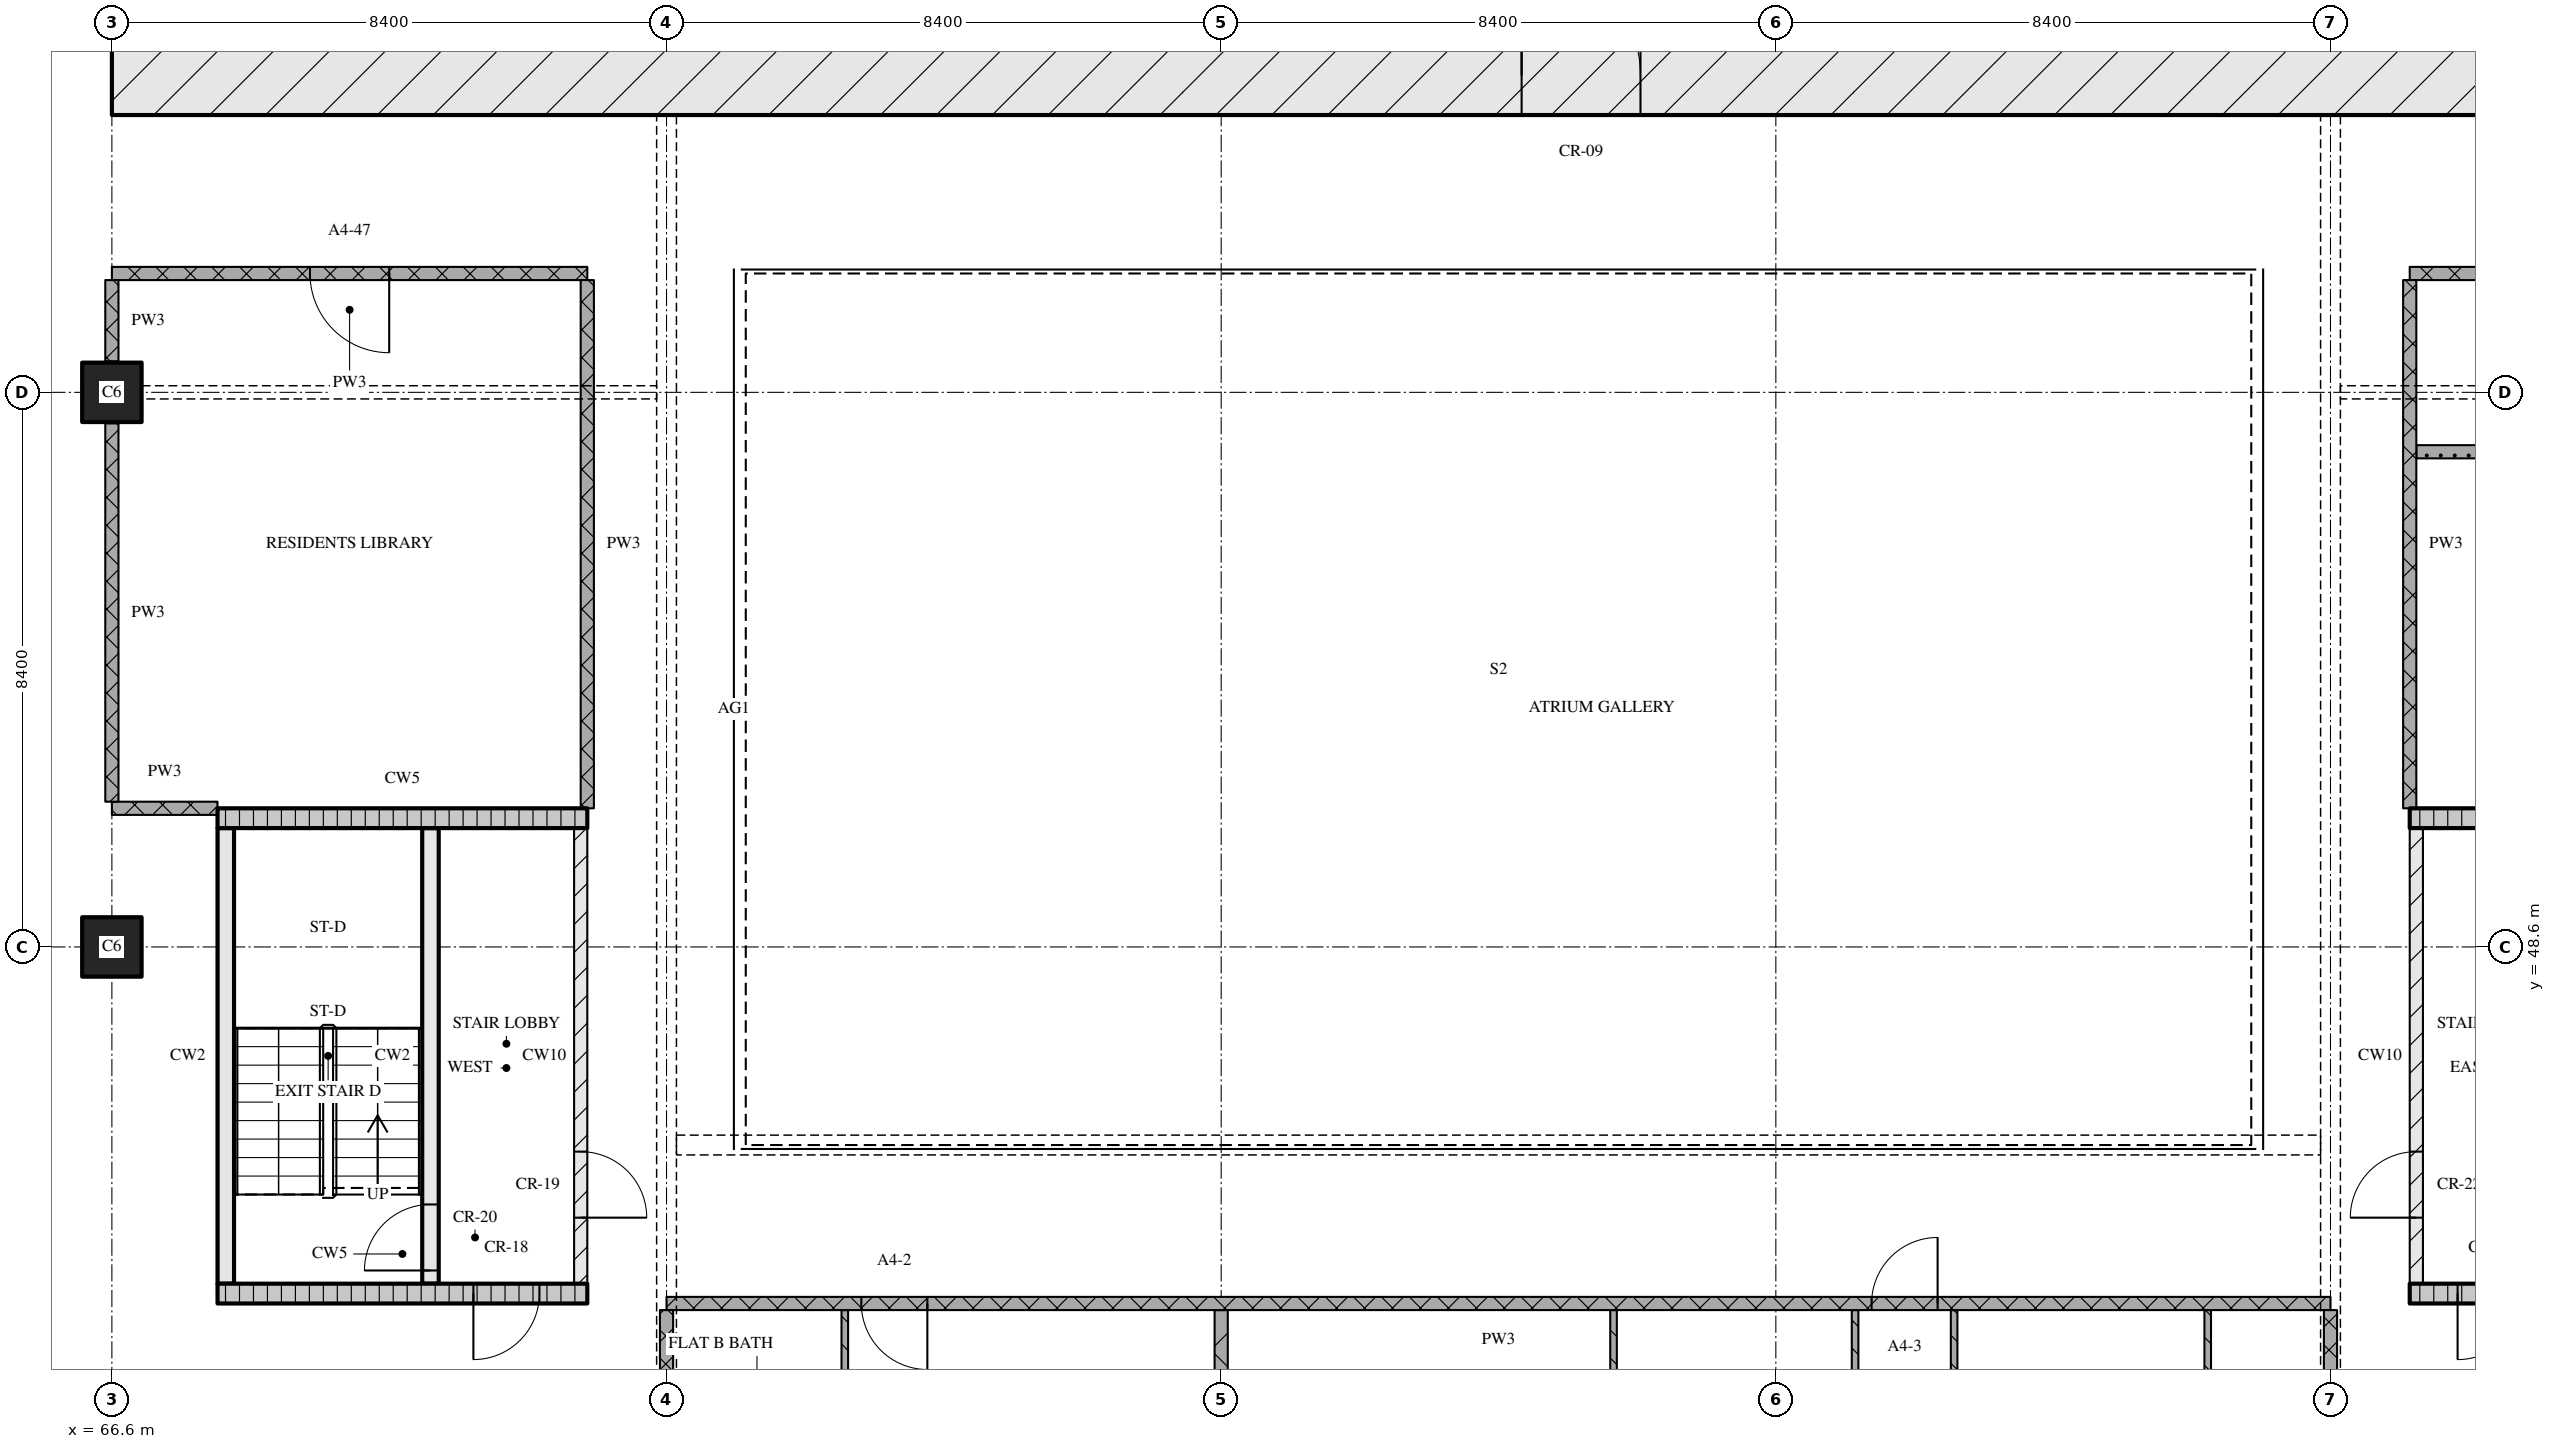
"""IFC4 building model, lengths in metres.
Left out: names, types, materials, properties, quantities, classifications, styles, units other than length and angle.
Written with IfcOpenShell. Run it as: python <this file> out.ifc"""

import sys

from ifc_helpers import new_model, si_unit, direction, frame, frame_2d, origin, origin_2d, place, context, subcontext, project, spatial, rectangle, extrude, element, fill, save


model = new_model("IFC4")
c1 = context("Model", 3, precision=1e-05, world=origin(), true_north=direction((0.0, 1.0)))
c2 = subcontext(c1, "Body", "Model", "MODEL_VIEW")
j1 = project(units=[si_unit("LENGTHUNIT", "METRE"), si_unit("PLANEANGLEUNIT", "RADIAN")], contexts=[c1])
p1 = place(None, origin())
s1 = spatial("IfcSite", under=j1, at=p1, CompositionType="ELEMENT")
p2 = place(p1, origin())
s2 = spatial("IfcBuilding", under=s1, at=p2, CompositionType="ELEMENT")
p3 = place(p2, frame((0.0, 0.0, 73.2)))
s3 = spatial("IfcBuildingStorey", under=s2, at=p3, CompositionType="ELEMENT", Elevation=73.2)
for number, where, z_axis, x_axis in (
    (1, (66.6, 48.6, 0.0), (0.0, 0.0, 1.0), (1.0, 0.0, 0.0)),
    (2, (66.6, 57.0, 0.0), (0.0, 0.0, 1.0), (1.0, 0.0, 0.0)),
):
    element("IfcColumn", number, at=place(p3, frame(where, z_axis=z_axis, x_axis=x_axis)), inside=s3, PredefinedType="COLUMN", context=c2, shape_type="SweptSolid", body=[
        extrude(rectangle(XDim=0.9, YDim=0.9, at=origin_2d()), origin(), (0.0, 0.0, 1.0), 3.6),
    ])
p4 = place(p3, frame((66.6, 61.8, 0.0), z_axis=(0.0, 0.0, 1.0), x_axis=(1.0, 0.0, 0.0)))
e3 = element("IfcWall", 3, at=p4, inside=s3, PredefinedType="SOLIDWALL", context=c2, shape_type="SweptSolid", body=[
    extrude(rectangle(XDim=42.0, YDim=1.2, at=frame_2d((21.0, 0.0))), origin(), (0.0, 0.0, 1.0), 3.32),
])
p5 = place(p4, frame((21.35, 0.0, 0.0)))
e4 = element("IfcOpeningElement", 4, at=p5, cuts=e3, PredefinedType="OPENING", context=c2, shape_type="SweptSolid", body=[
    extrude(rectangle(XDim=1.8, YDim=2.1, at=frame_2d((0.9, 1.05))), frame((0.0, 0.61, 0.0), z_axis=(0.0, -1.0, 0.0), x_axis=(1.0, 0.0, 0.0)), (0.0, 0.0, 1.0), 1.22),
])
p6 = place(p3, frame((68.2, 43.35, 0.0), z_axis=(0.0, 0.0, 1.0), x_axis=(1.0, 0.0, 0.0)))
e5 = element("IfcWall", 5, at=p6, inside=s3, PredefinedType="SOLIDWALL", context=c2, shape_type="SweptSolid", body=[
    extrude(rectangle(XDim=5.6, YDim=0.3, at=frame_2d((2.8, 0.0))), origin(), (0.0, 0.0, 1.0), 3.32),
])
p7 = place(p6, frame((3.875, 0.0, 0.0)))
e6 = element("IfcOpeningElement", 6, at=p7, cuts=e5, PredefinedType="OPENING", context=c2, shape_type="SweptSolid", body=[
    extrude(rectangle(XDim=1.0, YDim=2.1, at=frame_2d((0.5, 1.05))), frame((0.0, 0.16, 0.0), z_axis=(0.0, -1.0, 0.0), x_axis=(1.0, 0.0, 0.0)), (0.0, 0.0, 1.0), 0.32),
])
p8 = place(p3, frame((68.325, 43.5, 0.0), z_axis=(0.0, 0.0, 1.0), x_axis=(0.0, 1.0, 0.0)))
e7 = element("IfcWall", 7, at=p8, inside=s3, PredefinedType="SOLIDWALL", context=c2, shape_type="SweptSolid", body=[
    extrude(rectangle(XDim=6.9, YDim=0.25, at=frame_2d((3.45, 0.0))), origin(), (0.0, 0.0, 1.0), 3.32),
])
p9 = place(p3, frame((71.425, 43.5, 0.0), z_axis=(0.0, 0.0, 1.0), x_axis=(0.0, 1.0, 0.0)))
e8 = element("IfcWall", 8, at=p9, inside=s3, PredefinedType="SOLIDWALL", context=c2, shape_type="SweptSolid", body=[
    extrude(rectangle(XDim=6.9, YDim=0.25, at=frame_2d((3.45, 0.0))), origin(), (0.0, 0.0, 1.0), 3.32),
])
p10 = place(p9, frame((0.2, 0.0, 0.0)))
e9 = element("IfcOpeningElement", 9, at=p10, cuts=e8, PredefinedType="OPENING", context=c2, shape_type="SweptSolid", body=[
    extrude(rectangle(XDim=1.0, YDim=2.1, at=frame_2d((0.5, 1.05))), frame((0.0, 0.135, 0.0), z_axis=(0.0, -1.0, 0.0), x_axis=(1.0, 0.0, 0.0)), (0.0, 0.0, 1.0), 0.27),
])
p11 = place(p3, frame((73.7, 43.5, 0.0), z_axis=(0.0, 0.0, 1.0), x_axis=(0.0, 1.0, 0.0)))
e10 = element("IfcWall", 10, at=p11, inside=s3, PredefinedType="PARTITIONING", context=c2, shape_type="SweptSolid", body=[
    extrude(rectangle(XDim=6.9, YDim=0.2, at=frame_2d((3.45, 0.0))), origin(), (0.0, 0.0, 1.0), 3.32),
])
p12 = place(p11, frame((1.0, 0.0, 0.0)))
e11 = element("IfcOpeningElement", 11, at=p12, cuts=e10, PredefinedType="OPENING", context=c2, shape_type="SweptSolid", body=[
    extrude(rectangle(XDim=1.0, YDim=2.1, at=frame_2d((0.5, 1.05))), frame((0.0, 0.11, 0.0), z_axis=(0.0, -1.0, 0.0), x_axis=(1.0, 0.0, 0.0)), (0.0, 0.0, 1.0), 0.22),
])
p13 = place(p3, frame((68.2, 50.55, 0.0), z_axis=(0.0, 0.0, 1.0), x_axis=(1.0, 0.0, 0.0)))
e12 = element("IfcWall", 12, at=p13, inside=s3, PredefinedType="SOLIDWALL", context=c2, shape_type="SweptSolid", body=[
    extrude(rectangle(XDim=5.6, YDim=0.3, at=frame_2d((2.8, 0.0))), origin(), (0.0, 0.0, 1.0), 3.32),
])
p14 = place(p3, frame((101.4, 43.35, 0.0), z_axis=(0.0, 0.0, 1.0), x_axis=(1.0, 0.0, 0.0)))
e13 = element("IfcWall", 13, at=p14, inside=s3, PredefinedType="SOLIDWALL", context=c2, shape_type="SweptSolid", body=[
    extrude(rectangle(XDim=5.6, YDim=0.3, at=frame_2d((2.8, 0.0))), origin(), (0.0, 0.0, 1.0), 3.32),
])
p15 = place(p14, frame((0.725, 0.0, 0.0)))
e14 = element("IfcOpeningElement", 14, at=p15, cuts=e13, PredefinedType="OPENING", context=c2, shape_type="SweptSolid", body=[
    extrude(rectangle(XDim=1.0, YDim=2.1, at=frame_2d((0.5, 1.05))), frame((0.0, 0.16, 0.0), z_axis=(0.0, -1.0, 0.0), x_axis=(1.0, 0.0, 0.0)), (0.0, 0.0, 1.0), 0.32),
])
p16 = place(p3, frame((101.5, 43.5, 0.0), z_axis=(0.0, 0.0, 1.0), x_axis=(0.0, 1.0, 0.0)))
e15 = element("IfcWall", 15, at=p16, inside=s3, PredefinedType="PARTITIONING", context=c2, shape_type="SweptSolid", body=[
    extrude(rectangle(XDim=6.9, YDim=0.2, at=frame_2d((3.45, 0.0))), origin(), (0.0, 0.0, 1.0), 3.32),
])
p17 = place(p16, frame((1.0, 0.0, 0.0)))
e16 = element("IfcOpeningElement", 16, at=p17, cuts=e15, PredefinedType="OPENING", context=c2, shape_type="SweptSolid", body=[
    extrude(rectangle(XDim=1.0, YDim=2.1, at=frame_2d((0.5, 1.05))), frame((0.0, 0.11, 0.0), z_axis=(0.0, -1.0, 0.0), x_axis=(1.0, 0.0, 0.0)), (0.0, 0.0, 1.0), 0.22),
])
p18 = place(p3, frame((101.4, 50.55, 0.0), z_axis=(0.0, 0.0, 1.0), x_axis=(1.0, 0.0, 0.0)))
e17 = element("IfcWall", 17, at=p18, inside=s3, PredefinedType="SOLIDWALL", context=c2, shape_type="SweptSolid", body=[
    extrude(rectangle(XDim=5.6, YDim=0.3, at=frame_2d((2.8, 0.0))), origin(), (0.0, 0.0, 1.0), 3.32),
])
p19 = place(p3, frame((100.2, 43.2, 0.0), z_axis=(0.0, 0.0, 1.0), x_axis=(-1.0, 0.0, 0.0)))
e18 = element("IfcWall", 18, at=p19, inside=s3, PredefinedType="PARTITIONING", context=c2, shape_type="SweptSolid", body=[
    extrude(rectangle(XDim=25.2, YDim=0.2, at=frame_2d((12.6, 0.0))), origin(), (0.0, 0.0, 1.0), 3.32),
])
p20 = place(p19, frame((5.95, 0.0, 0.0)))
e19 = element("IfcOpeningElement", 19, at=p20, cuts=e18, PredefinedType="OPENING", context=c2, shape_type="SweptSolid", body=[
    extrude(rectangle(XDim=1.0, YDim=2.1, at=frame_2d((0.5, 1.05))), frame((0.0, 0.11, 0.0), z_axis=(0.0, -1.0, 0.0), x_axis=(1.0, 0.0, 0.0)), (0.0, 0.0, 1.0), 0.22),
])
p21 = place(p19, frame((21.25, 0.0, 0.0)))
e20 = element("IfcOpeningElement", 20, at=p21, cuts=e18, PredefinedType="OPENING", context=c2, shape_type="SweptSolid", body=[
    extrude(rectangle(XDim=1.0, YDim=2.1, at=frame_2d((0.5, 1.05))), frame((0.0, 0.11, 0.0), z_axis=(0.0, -1.0, 0.0), x_axis=(1.0, 0.0, 0.0)), (0.0, 0.0, 1.0), 0.22),
])
p22 = place(p3, frame((66.6, 50.7, 0.0), z_axis=(0.0, 0.0, 1.0), x_axis=(1.0, 0.0, 0.0)))
e21 = element("IfcWall", 21, at=p22, inside=s3, PredefinedType="PARTITIONING", context=c2, shape_type="SweptSolid", body=[
    extrude(rectangle(XDim=1.6, YDim=0.2, at=frame_2d((0.8, 0.0))), origin(), (0.0, 0.0, 1.0), 3.32),
])
p23 = place(p3, frame((101.5, 56.1, 0.0), z_axis=(0.0, 0.0, 1.0), x_axis=(1.0, 0.0, 0.0)))
e22 = element("IfcWall", 22, at=p23, inside=s3, PredefinedType="PARTITIONING", context=c2, shape_type="SweptSolid", body=[
    extrude(rectangle(XDim=7.0, YDim=0.2, at=frame_2d((3.5, 0.0))), origin(), (0.0, 0.0, 1.0), 3.32),
])
p24 = place(p3, frame((73.8, 58.8, 0.0), z_axis=(0.0, 0.0, 1.0), x_axis=(-1.0, 0.0, 0.0)))
e23 = element("IfcWall", 23, at=p24, inside=s3, PredefinedType="PARTITIONING", context=c2, shape_type="SweptSolid", body=[
    extrude(rectangle(XDim=7.2, YDim=0.2, at=frame_2d((3.6, 0.0))), origin(), (0.0, 0.0, 1.0), 3.32),
])
p25 = place(p24, frame((3.0, 0.0, 0.0)))
e24 = element("IfcOpeningElement", 24, at=p25, cuts=e23, PredefinedType="OPENING", context=c2, shape_type="SweptSolid", body=[
    extrude(rectangle(XDim=1.2, YDim=2.1, at=frame_2d((0.6, 1.05))), frame((0.0, 0.11, 0.0), z_axis=(0.0, -1.0, 0.0), x_axis=(1.0, 0.0, 0.0)), (0.0, 0.0, 1.0), 0.22),
])
p26 = place(p3, frame((101.4, 58.8, 0.0), z_axis=(0.0, 0.0, 1.0), x_axis=(1.0, 0.0, 0.0)))
e25 = element("IfcWall", 25, at=p26, inside=s3, PredefinedType="PARTITIONING", context=c2, shape_type="SweptSolid", body=[
    extrude(rectangle(XDim=7.2, YDim=0.2, at=frame_2d((3.6, 0.0))), origin(), (0.0, 0.0, 1.0), 3.32),
])
p27 = place(p3, frame((66.6, 56.53, 0.0), z_axis=(0.0, 0.0, 1.0), x_axis=(0.0, -1.0, 0.0)))
e26 = element("IfcWall", 26, at=p27, inside=s3, PredefinedType="PARTITIONING", context=c2, shape_type="SweptSolid", body=[
    extrude(rectangle(XDim=5.73, YDim=0.2, at=frame_2d((2.865, 0.0))), origin(), (0.0, 0.0, 1.0), 3.32),
])
p28 = place(p3, frame((66.6, 58.7, 0.0), z_axis=(0.0, 0.0, 1.0), x_axis=(0.0, -1.0, 0.0)))
e27 = element("IfcWall", 27, at=p28, inside=s3, PredefinedType="PARTITIONING", context=c2, shape_type="SweptSolid", body=[
    extrude(rectangle(XDim=1.23, YDim=0.2, at=frame_2d((0.615, 0.0))), origin(), (0.0, 0.0, 1.0), 3.32),
])
p29 = place(p3, frame((73.8, 58.7, 0.0), z_axis=(0.0, 0.0, 1.0), x_axis=(0.0, -1.0, 0.0)))
e28 = element("IfcWall", 28, at=p29, inside=s3, PredefinedType="PARTITIONING", context=c2, shape_type="SweptSolid", body=[
    extrude(rectangle(XDim=8.0, YDim=0.2, at=frame_2d((4.0, 0.0))), origin(), (0.0, 0.0, 1.0), 3.32),
])
p30 = place(p3, frame((75.0, 43.1, 0.0), z_axis=(0.0, 0.0, 1.0), x_axis=(0.0, -1.0, 0.0)))
e29 = element("IfcWall", 29, at=p30, inside=s3, PredefinedType="PARTITIONING", context=c2, shape_type="SweptSolid", body=[
    extrude(rectangle(XDim=2.2, YDim=0.2, at=frame_2d((1.1, 0.0))), origin(), (0.0, 0.0, 1.0), 2.43),
])
p31 = place(p3, frame((77.7, 43.1, 0.0), z_axis=(0.0, 0.0, 1.0), x_axis=(0.0, -1.0, 0.0)))
e30 = element("IfcWall", 30, at=p31, inside=s3, PredefinedType="PARTITIONING", context=c2, shape_type="SweptSolid", body=[
    extrude(rectangle(XDim=2.85, YDim=0.1, at=frame_2d((1.425, 0.0))), origin(), (0.0, 0.0, 1.0), 3.32),
])
p32 = place(p3, frame((83.4, 43.1, 0.0), z_axis=(0.0, 0.0, 1.0), x_axis=(0.0, -1.0, 0.0)))
e31 = element("IfcWall", 31, at=p32, inside=s3, PredefinedType="PARTITIONING", context=c2, shape_type="SweptSolid", body=[
    extrude(rectangle(XDim=2.43, YDim=0.2, at=frame_2d((1.215, 0.0))), origin(), (0.0, 0.0, 1.0), 3.32),
])
for number, where, z_axis, x_axis in (
    (32, (89.342, 43.1, 0.0), (0.0, 0.0, 1.0), (0.0, -1.0, 0.0)),
    (33, (93.0, 43.1, 0.0), (0.0, 0.0, 1.0), (0.0, -1.0, 0.0)),
):
    element("IfcWall", number, at=place(p3, frame(where, z_axis=z_axis, x_axis=x_axis)), inside=s3, PredefinedType="PARTITIONING", context=c2, shape_type="SweptSolid", body=[
        extrude(rectangle(XDim=6.75, YDim=0.1, at=frame_2d((3.375, 0.0))), origin(), (0.0, 0.0, 1.0), 3.32),
    ])
p33 = place(p3, frame((94.5, 43.1, 0.0), z_axis=(0.0, 0.0, 1.0), x_axis=(0.0, -1.0, 0.0)))
e34 = element("IfcWall", 34, at=p33, inside=s3, PredefinedType="PARTITIONING", context=c2, shape_type="SweptSolid", body=[
    extrude(rectangle(XDim=6.75, YDim=0.1, at=frame_2d((3.375, 0.0))), origin(), (0.0, 0.0, 1.0), 3.32),
])
p34 = place(p33, frame((2.95, 0.0, 0.0)))
e35 = element("IfcOpeningElement", 35, at=p34, cuts=e34, PredefinedType="OPENING", context=c2, shape_type="SweptSolid", body=[
    extrude(rectangle(XDim=0.8, YDim=2.1, at=frame_2d((0.4, 1.05))), frame((0.0, 0.06, 0.0), z_axis=(0.0, -1.0, 0.0), x_axis=(1.0, 0.0, 0.0)), (0.0, 0.0, 1.0), 0.12),
])
p35 = place(p3, frame((98.341, 43.1, 0.0), z_axis=(0.0, 0.0, 1.0), x_axis=(0.0, -1.0, 0.0)))
e36 = element("IfcWall", 36, at=p35, inside=s3, PredefinedType="PARTITIONING", context=c2, shape_type="SweptSolid", body=[
    extrude(rectangle(XDim=6.75, YDim=0.1, at=frame_2d((3.375, 0.0))), origin(), (0.0, 0.0, 1.0), 3.32),
])
p36 = place(p3, frame((100.2, 43.1, 0.0), z_axis=(0.0, 0.0, 1.0), x_axis=(0.0, -1.0, 0.0)))
e37 = element("IfcWall", 37, at=p36, inside=s3, PredefinedType="PARTITIONING", context=c2, shape_type="SweptSolid", body=[
    extrude(rectangle(XDim=2.2, YDim=0.2, at=frame_2d((1.1, 0.0))), origin(), (0.0, 0.0, 1.0), 2.43),
])
p37 = place(p3, frame((101.4, 58.7, 0.0), z_axis=(0.0, 0.0, 1.0), x_axis=(0.0, -1.0, 0.0)))
e38 = element("IfcWall", 38, at=p37, inside=s3, PredefinedType="PARTITIONING", context=c2, shape_type="SweptSolid", body=[
    extrude(rectangle(XDim=8.0, YDim=0.2, at=frame_2d((4.0, 0.0))), origin(), (0.0, 0.0, 1.0), 3.32),
])
p38 = place(p5, origin())
e39 = element("IfcDoor", 39, at=p38, inside=s3, OperationType="DOUBLE_DOOR_SINGLE_SWING", PredefinedType="DOOR", context=c2, shape_type="SweptSolid", body=[
    extrude(rectangle(XDim=1.8, YDim=2.1, at=frame_2d((0.9, 1.05))), frame((0.0, 0.025, 0.0), z_axis=(0.0, -1.0, 0.0), x_axis=(1.0, 0.0, 0.0)), (0.0, 0.0, 1.0), 0.05),
])
fill(e4, e39)
p39 = place(p7, origin())
e40 = element("IfcDoor", 40, at=p39, inside=s3, OperationType="SINGLE_SWING_RIGHT", PredefinedType="DOOR", context=c2, shape_type="SweptSolid", body=[
    extrude(rectangle(XDim=1.0, YDim=2.1, at=frame_2d((0.5, 1.05))), frame((0.0, 0.025, 0.0), z_axis=(0.0, -1.0, 0.0), x_axis=(1.0, 0.0, 0.0)), (0.0, 0.0, 1.0), 0.05),
])
fill(e6, e40)
p40 = place(p10, origin())
e41 = element("IfcDoor", 41, at=p40, inside=s3, OperationType="SINGLE_SWING_LEFT", PredefinedType="DOOR", context=c2, shape_type="SweptSolid", body=[
    extrude(rectangle(XDim=1.0, YDim=2.1, at=frame_2d((0.5, 1.05))), frame((0.0, 0.025, 0.0), z_axis=(0.0, -1.0, 0.0), x_axis=(1.0, 0.0, 0.0)), (0.0, 0.0, 1.0), 0.05),
])
fill(e9, e41)
p41 = place(p12, origin())
e42 = element("IfcDoor", 42, at=p41, inside=s3, OperationType="SINGLE_SWING_RIGHT", PredefinedType="DOOR", context=c2, shape_type="SweptSolid", body=[
    extrude(rectangle(XDim=1.0, YDim=2.1, at=frame_2d((0.5, 1.05))), frame((0.0, 0.025, 0.0), z_axis=(0.0, -1.0, 0.0), x_axis=(1.0, 0.0, 0.0)), (0.0, 0.0, 1.0), 0.05),
])
fill(e11, e42)
p42 = place(p15, origin())
e43 = element("IfcDoor", 43, at=p42, inside=s3, OperationType="SINGLE_SWING_RIGHT", PredefinedType="DOOR", context=c2, shape_type="SweptSolid", body=[
    extrude(rectangle(XDim=1.0, YDim=2.1, at=frame_2d((0.5, 1.05))), frame((0.0, 0.025, 0.0), z_axis=(0.0, -1.0, 0.0), x_axis=(1.0, 0.0, 0.0)), (0.0, 0.0, 1.0), 0.05),
])
fill(e14, e43)
p43 = place(p17, origin())
e44 = element("IfcDoor", 44, at=p43, inside=s3, OperationType="SINGLE_SWING_LEFT", PredefinedType="DOOR", context=c2, shape_type="SweptSolid", body=[
    extrude(rectangle(XDim=1.0, YDim=2.1, at=frame_2d((0.5, 1.05))), frame((0.0, 0.025, 0.0), z_axis=(0.0, -1.0, 0.0), x_axis=(1.0, 0.0, 0.0)), (0.0, 0.0, 1.0), 0.05),
])
fill(e16, e44)
p44 = place(p20, origin())
e45 = element("IfcDoor", 45, at=p44, inside=s3, OperationType="SINGLE_SWING_RIGHT", PredefinedType="DOOR", context=c2, shape_type="SweptSolid", body=[
    extrude(rectangle(XDim=1.0, YDim=2.1, at=frame_2d((0.5, 1.05))), frame((0.0, 0.025, 0.0), z_axis=(0.0, -1.0, 0.0), x_axis=(1.0, 0.0, 0.0)), (0.0, 0.0, 1.0), 0.05),
])
fill(e19, e45)
p45 = place(p21, origin())
e46 = element("IfcDoor", 46, at=p45, inside=s3, OperationType="SINGLE_SWING_LEFT", PredefinedType="DOOR", context=c2, shape_type="SweptSolid", body=[
    extrude(rectangle(XDim=1.0, YDim=2.1, at=frame_2d((0.5, 1.05))), frame((0.0, 0.025, 0.0), z_axis=(0.0, -1.0, 0.0), x_axis=(1.0, 0.0, 0.0)), (0.0, 0.0, 1.0), 0.05),
])
fill(e20, e46)
p46 = place(p25, origin())
e47 = element("IfcDoor", 47, at=p46, inside=s3, OperationType="SINGLE_SWING_LEFT", PredefinedType="DOOR", context=c2, shape_type="SweptSolid", body=[
    extrude(rectangle(XDim=1.2, YDim=2.1, at=frame_2d((0.6, 1.05))), frame((0.0, 0.025, 0.0), z_axis=(0.0, -1.0, 0.0), x_axis=(1.0, 0.0, 0.0)), (0.0, 0.0, 1.0), 0.05),
])
fill(e24, e47)
save(model, sys.argv[1])
